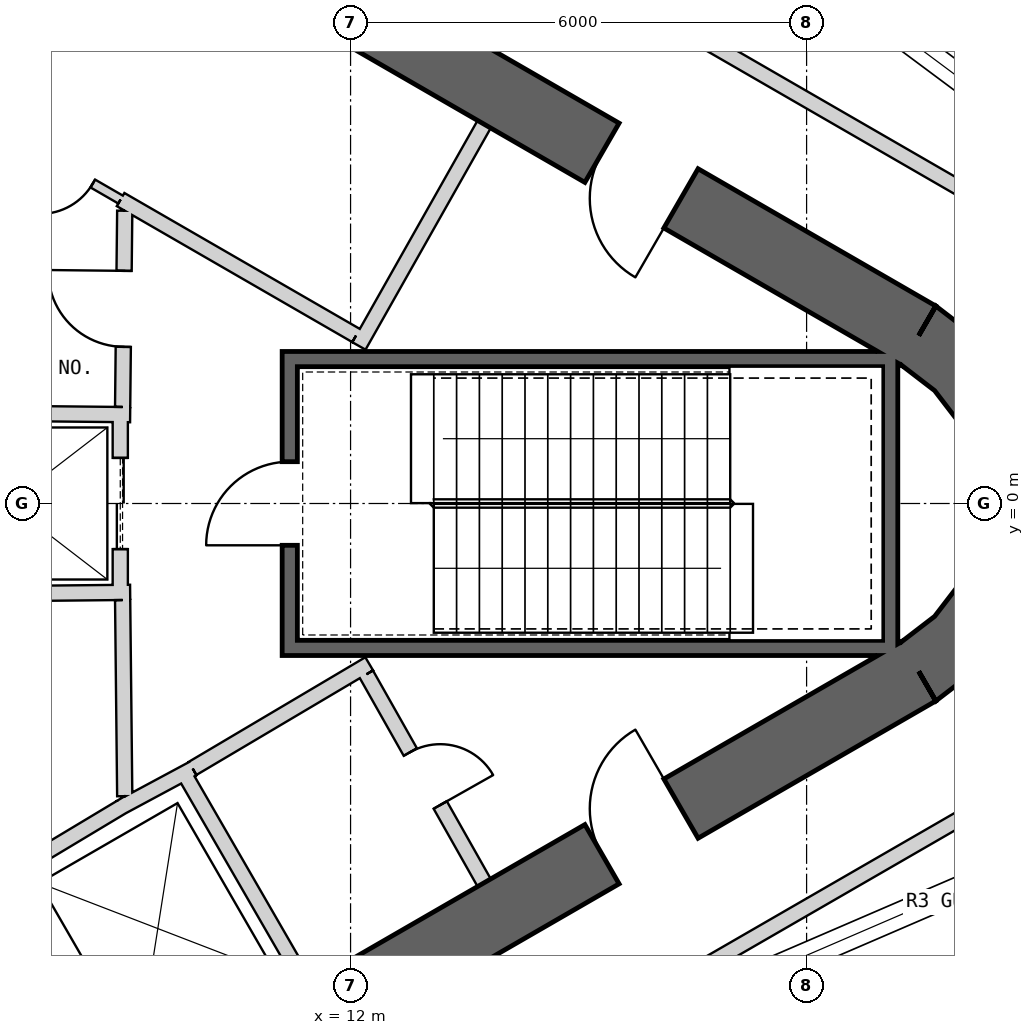
"""IFC4 building model, lengths in metres.
Left out: names, types, materials, properties, quantities, classifications, styles, units other than length and angle.
Written with IfcOpenShell. Run it as: python <this file> out.ifc"""

import sys

from ifc_helpers import new_model, si_unit, direction, frame, frame_2d, origin, place, context, subcontext, project, spatial, polyline, rectangle, outline, extrude, element, fill, save


model = new_model("IFC4")
c1 = context("Model", 3, precision=1e-05, world=origin(), true_north=direction((0.0, 1.0)))
c2 = subcontext(c1, "Body", "Model", "MODEL_VIEW")
j1 = project(units=[si_unit("LENGTHUNIT", "METRE"), si_unit("PLANEANGLEUNIT", "RADIAN")], contexts=[c1])
p1 = place(None, origin())
s1 = spatial("IfcSite", under=j1, at=p1, CompositionType="ELEMENT")
p2 = place(p1, origin())
s2 = spatial("IfcBuilding", under=s1, at=p2, CompositionType="ELEMENT")
p3 = place(p2, frame((0.0, 0.0, 440.3)))
s3 = spatial("IfcBuildingStorey", under=s2, at=p3, CompositionType="ELEMENT", Elevation=440.3)
p4 = place(p3, frame((19.475, 2.208, 0.0), z_axis=(0.0, 0.0, 1.0), x_axis=(-0.866028369851, 0.499994862586, 0.0)))
e1 = element("IfcWall", 1, at=p4, inside=s3, PredefinedType="SHEAR", context=c2, shape_type="SweptSolid", body=[
    extrude(rectangle(XDim=31.523, YDim=0.9, at=frame_2d((15.762, 0.0))), origin(), (0.0, 0.0, 1.0), 4.7),
])
p5 = place(p4, frame((3.612, 0.0, 0.0)))
e2 = element("IfcOpeningElement", 2, at=p5, cuts=e1, PredefinedType="OPENING", context=c2, shape_type="SweptSolid", body=[
    extrude(rectangle(XDim=1.2, YDim=2.4, at=frame_2d((0.6, 1.2))), frame((0.0, 0.46, 0.0), z_axis=(0.0, -1.0, 0.0), x_axis=(1.0, 0.0, 0.0)), (0.0, 0.0, 1.0), 0.92),
])
p6 = place(p4, frame((26.712, 0.0, 0.0)))
e3 = element("IfcOpeningElement", 3, at=p6, cuts=e1, PredefinedType="OPENING", context=c2, shape_type="SweptSolid", body=[
    extrude(rectangle(XDim=1.2, YDim=2.4, at=frame_2d((0.6, 1.2))), frame((0.0, 0.46, 0.0), z_axis=(0.0, -1.0, 0.0), x_axis=(1.0, 0.0, 0.0)), (0.0, 0.0, 1.0), 0.92),
])
p7 = place(p3, frame((-7.825, -17.97, 0.0), z_axis=(0.0, 0.0, 1.0), x_axis=(0.866028369851, 0.499994862586, 0.0)))
e4 = element("IfcWall", 4, at=p7, inside=s3, PredefinedType="SHEAR", context=c2, shape_type="SweptSolid", body=[
    extrude(rectangle(XDim=31.523, YDim=0.9, at=frame_2d((15.762, 0.0))), origin(), (0.0, 0.0, 1.0), 4.7),
])
p8 = place(p7, frame((17.862, 0.0, 0.0)))
e5 = element("IfcOpeningElement", 5, at=p8, cuts=e4, PredefinedType="OPENING", context=c2, shape_type="SweptSolid", body=[
    extrude(rectangle(XDim=1.2, YDim=2.4, at=frame_2d((0.6, 1.2))), frame((0.0, 0.46, 0.0), z_axis=(0.0, -1.0, 0.0), x_axis=(1.0, 0.0, 0.0)), (0.0, 0.0, 1.0), 0.92),
])
p9 = place(p7, frame((20.562, 0.0, 0.0)))
e6 = element("IfcOpeningElement", 6, at=p9, cuts=e4, PredefinedType="OPENING", context=c2, shape_type="SweptSolid", body=[
    extrude(rectangle(XDim=1.2, YDim=2.4, at=frame_2d((0.6, 1.2))), frame((0.0, 0.46, 0.0), z_axis=(0.0, -1.0, 0.0), x_axis=(1.0, 0.0, 0.0)), (0.0, 0.0, 1.0), 0.92),
])
p10 = place(p7, frame((26.712, 0.0, 0.0)))
e7 = element("IfcOpeningElement", 7, at=p10, cuts=e4, PredefinedType="OPENING", context=c2, shape_type="SweptSolid", body=[
    extrude(rectangle(XDim=1.2, YDim=2.4, at=frame_2d((0.6, 1.2))), frame((0.0, 0.46, 0.0), z_axis=(0.0, -1.0, 0.0), x_axis=(1.0, 0.0, 0.0)), (0.0, 0.0, 1.0), 0.92),
])
p11 = place(p7, frame((3.612, 0.0, 0.0)))
e8 = element("IfcOpeningElement", 8, at=p11, cuts=e4, PredefinedType="OPENING", context=c2, shape_type="SweptSolid", body=[
    extrude(rectangle(XDim=1.2, YDim=2.4, at=frame_2d((0.6, 1.2))), frame((0.0, 0.46, 0.0), z_axis=(0.0, -1.0, 0.0), x_axis=(1.0, 0.0, 0.0)), (0.0, 0.0, 1.0), 0.92),
])
p12 = place(p3, origin())
e9 = element("IfcWall", 9, at=p12, inside=s3, PredefinedType="SHEAR", context=c2, shape_type="SweptSolid", body=[
    extrude(outline(polyline([(19.7, -2.598), (20.321, -2.121), (20.798, -1.5), (21.098, -0.777), (21.2, 0.0), (21.098, 0.777), (20.798, 1.5), (20.321, 2.121), (19.7, 2.598), (19.25, 1.819), (19.685, 1.485), (20.019, 1.05), (20.229, 0.543), (20.3, 0.0), (20.229, -0.543), (20.019, -1.05), (19.685, -1.485), (19.25, -1.819), (19.7, -2.598)])), origin(), (0.0, 0.0, 1.0), 4.7),
])
p13 = place(p3, frame((9.795, -3.525, 0.0), z_axis=(0.0, 0.0, 1.0), x_axis=(0.499984717929, -0.866034226713, 0.0)))
e10 = element("IfcWall", 10, at=p13, inside=s3, PredefinedType="PLUMBINGWALL", context=c2, shape_type="SweptSolid", body=[
    extrude(rectangle(XDim=3.25, YDim=0.2, at=frame_2d((1.625, 0.0))), origin(), (0.0, 0.0, 1.0), 4.7),
])
p14 = place(p3, frame((8.974, -3.999, 0.0), z_axis=(0.0, 0.0, 1.0), x_axis=(0.880907015104, 0.473289373154, 0.0)))
e11 = element("IfcWall", 11, at=p14, inside=s3, PredefinedType="PLUMBINGWALL", context=c2, shape_type="SweptSolid", body=[
    extrude(rectangle(XDim=1.078, YDim=0.2, at=frame_2d((0.539, 0.0))), origin(), (0.0, 0.0, 1.0), 4.7),
])
p15 = place(p3, frame((7.497, -4.886, 0.0), z_axis=(0.0, 0.0, 1.0), x_axis=(0.857516281273, 0.51445682749, 0.0)))
e12 = element("IfcWall", 12, at=p15, inside=s3, PredefinedType="PLUMBINGWALL", context=c2, shape_type="SweptSolid", body=[
    extrude(rectangle(XDim=1.845, YDim=0.2, at=frame_2d((0.922, 0.0))), origin(), (0.0, 0.0, 1.0), 4.7),
])
p16 = place(p3, frame((19.2, 1.9, -0.25), z_axis=(0.0, 0.0, 1.0), x_axis=(-1.0, 0.0, 0.0)))
e13 = element("IfcWall", 13, at=p16, inside=s3, PredefinedType="SHEAR", context=c2, shape_type="SweptSolid", body=[
    extrude(rectangle(XDim=8.1, YDim=0.2, at=frame_2d((4.05, 0.0))), origin(), (0.0, 0.0, 1.0), 4.95),
])
p17 = place(p3, frame((19.1, -2.0, -0.25), z_axis=(0.0, 0.0, 1.0), x_axis=(0.0, 1.0, 0.0)))
e14 = element("IfcWall", 14, at=p17, inside=s3, PredefinedType="SHEAR", context=c2, shape_type="SweptSolid", body=[
    extrude(rectangle(XDim=3.8, YDim=0.2, at=frame_2d((1.9, 0.0))), origin(), (0.0, 0.0, 1.0), 4.95),
])
p18 = place(p3, frame((11.1, -1.9, -0.25), z_axis=(0.0, 0.0, 1.0), x_axis=(1.0, 0.0, 0.0)))
e15 = element("IfcWall", 15, at=p18, inside=s3, PredefinedType="SHEAR", context=c2, shape_type="SweptSolid", body=[
    extrude(rectangle(XDim=7.9, YDim=0.2, at=frame_2d((3.95, 0.0))), origin(), (0.0, 0.0, 1.0), 4.95),
])
p19 = place(p3, frame((11.2, -1.8, -0.25), z_axis=(0.0, 0.0, 1.0), x_axis=(0.0, 1.0, 0.0)))
e16 = element("IfcWall", 16, at=p19, inside=s3, PredefinedType="SHEAR", context=c2, shape_type="SweptSolid", body=[
    extrude(rectangle(XDim=3.6, YDim=0.2, at=frame_2d((1.8, 0.0))), origin(), (0.0, 0.0, 1.0), 4.95),
])
p20 = place(p19, frame((1.25, 0.0, 0.25)))
e17 = element("IfcOpeningElement", 17, at=p20, cuts=e16, PredefinedType="OPENING", context=c2, shape_type="SweptSolid", body=[
    extrude(rectangle(XDim=1.1, YDim=2.1, at=frame_2d((0.55, 1.05))), frame((0.0, 0.11, 0.0), z_axis=(0.0, -1.0, 0.0), x_axis=(1.0, 0.0, 0.0)), (0.0, 0.0, 1.0), 0.22),
])
p21 = place(p3, frame((8.97, 1.2, 0.0), z_axis=(0.0, 0.0, 1.0), x_axis=(0.0, -1.0, 0.0)))
e18 = element("IfcWall", 18, at=p21, inside=s3, PredefinedType="PLUMBINGWALL", context=c2, shape_type="SweptSolid", body=[
    extrude(rectangle(XDim=2.4, YDim=0.2, at=frame_2d((1.2, 0.0))), origin(), (0.0, 0.0, 1.0), 4.7),
])
p22 = place(p21, frame((0.6, 0.0, 0.0)))
e19 = element("IfcOpeningElement", 19, at=p22, cuts=e18, PredefinedType="OPENING", context=c2, shape_type="SweptSolid", body=[
    extrude(rectangle(XDim=1.2, YDim=2.4, at=frame_2d((0.6, 1.2))), frame((0.0, 0.11, 0.0), z_axis=(0.0, -1.0, 0.0), x_axis=(1.0, 0.0, 0.0)), (0.0, 0.0, 1.0), 0.22),
])
p23 = place(p3, frame((9.1, -1.169, 0.0), z_axis=(0.0, 0.0, 1.0), x_axis=(-0.999950064753, -0.009993397809, 0.0)))
e20 = element("IfcWall", 20, at=p23, inside=s3, PredefinedType="PLUMBINGWALL", context=c2, shape_type="SweptSolid", body=[
    extrude(rectangle(XDim=3.2, YDim=0.2, at=frame_2d((1.6, 0.0))), origin(), (0.0, 0.0, 1.0), 4.7),
])
p24 = place(p3, frame((9.1, 1.169, 0.0), z_axis=(0.0, 0.0, 1.0), x_axis=(-0.99994990606, 0.010009264196, 0.0)))
e21 = element("IfcWall", 21, at=p24, inside=s3, PredefinedType="PLUMBINGWALL", context=c2, shape_type="SweptSolid", body=[
    extrude(rectangle(XDim=3.0, YDim=0.2, at=frame_2d((1.5, 0.0))), origin(), (0.0, 0.0, 1.0), 4.7),
])
p25 = place(p3, frame((12.11, 2.073, 0.0), z_axis=(0.0, 0.0, 1.0), x_axis=(0.49196600604, 0.870614408852, 0.0)))
e22 = element("IfcWall", 22, at=p25, inside=s3, PredefinedType="PARTITIONING", context=c2, shape_type="SweptSolid", body=[
    extrude(rectangle(XDim=3.35, YDim=0.2, at=frame_2d((1.675, 0.0))), origin(), (0.0, 0.0, 1.0), 4.7),
])
p26 = place(p3, frame((8.974, 3.999, 0.0), z_axis=(0.0, 0.0, 1.0), x_axis=(0.86601284211, -0.500021756827, 0.0)))
e23 = element("IfcWall", 23, at=p26, inside=s3, PredefinedType="PARTITIONING", context=c2, shape_type="SweptSolid", body=[
    extrude(rectangle(XDim=3.577, YDim=0.2, at=frame_2d((1.789, 0.0))), origin(), (0.0, 0.0, 1.0), 4.7),
])
p27 = place(p3, frame((7.55, 4.821, 0.0), z_axis=(0.0, 0.0, 1.0), x_axis=(0.866069384335, -0.499923815713, 0.0)))
e24 = element("IfcWall", 24, at=p27, inside=s3, PredefinedType="PARTITIONING", context=c2, shape_type="SweptSolid", body=[
    extrude(rectangle(XDim=1.644, YDim=0.12, at=frame_2d((0.822, 0.0))), origin(), (0.0, 0.0, 1.0), 4.7),
])
p28 = place(p27, frame((0.422, 0.0, 0.0)))
e25 = element("IfcOpeningElement", 25, at=p28, cuts=e24, PredefinedType="OPENING", context=c2, shape_type="SweptSolid", body=[
    extrude(rectangle(XDim=0.8, YDim=2.1, at=frame_2d((0.4, 1.05))), frame((0.0, 0.07, 0.0), z_axis=(0.0, -1.0, 0.0), x_axis=(1.0, 0.0, 0.0)), (0.0, 0.0, 1.0), 0.14),
])
p29 = place(p3, frame((12.245, -2.109, 0.0), z_axis=(0.0, 0.0, 1.0), x_axis=(-0.860414880418, -0.509594185166, 0.0)))
e26 = element("IfcWall", 26, at=p29, inside=s3, PredefinedType="PARTITIONING", context=c2, shape_type="SweptSolid", body=[
    extrude(rectangle(XDim=2.7, YDim=0.2, at=frame_2d((1.35, 0.0))), origin(), (0.0, 0.0, 1.0), 4.7),
])
p30 = place(p3, frame((13.758, -4.99, 0.0), z_axis=(0.0, 0.0, 1.0), x_axis=(-0.491993409184, 0.87059892334, 0.0)))
e27 = element("IfcWall", 27, at=p30, inside=s3, PredefinedType="PARTITIONING", context=c2, shape_type="SweptSolid", body=[
    extrude(rectangle(XDim=3.15, YDim=0.2, at=frame_2d((1.575, 0.0))), origin(), (0.0, 0.0, 1.0), 4.7),
])
p31 = place(p30, frame((1.175, 0.0, 0.0)))
e28 = element("IfcOpeningElement", 28, at=p31, cuts=e27, PredefinedType="OPENING", context=c2, shape_type="SweptSolid", body=[
    extrude(rectangle(XDim=0.8, YDim=2.1, at=frame_2d((0.4, 1.05))), frame((0.0, 0.11, 0.0), z_axis=(0.0, -1.0, 0.0), x_axis=(1.0, 0.0, 0.0)), (0.0, 0.0, 1.0), 0.22),
])
p32 = place(p3, frame((9.029, -3.851, 0.0), z_axis=(0.0, 0.0, 1.0), x_axis=(-0.010784614026, 0.999941844359, 0.0)))
e29 = element("IfcWall", 29, at=p32, inside=s3, PredefinedType="PARTITIONING", context=c2, shape_type="SweptSolid", body=[
    extrude(rectangle(XDim=2.581, YDim=0.2, at=frame_2d((1.291, 0.0))), origin(), (0.0, 0.0, 1.0), 4.7),
])
p33 = place(p3, frame((9.001, 1.27, 0.0), z_axis=(0.0, 0.0, 1.0), x_axis=(0.010780534828, 0.999941888346, 0.0)))
e30 = element("IfcWall", 30, at=p33, inside=s3, PredefinedType="PARTITIONING", context=c2, shape_type="SweptSolid", body=[
    extrude(rectangle(XDim=2.582, YDim=0.2, at=frame_2d((1.291, 0.0))), origin(), (0.0, 0.0, 1.0), 4.7),
])
p34 = place(p33, frame((0.791, 0.0, 0.0)))
e31 = element("IfcOpeningElement", 31, at=p34, cuts=e30, PredefinedType="OPENING", context=c2, shape_type="SweptSolid", body=[
    extrude(rectangle(XDim=1.0, YDim=2.1, at=frame_2d((0.5, 1.05))), frame((0.0, 0.11, 0.0), z_axis=(0.0, -1.0, 0.0), x_axis=(1.0, 0.0, 0.0)), (0.0, 0.0, 1.0), 0.22),
])
p35 = place(p3, frame((20.834, 3.675, 0.0), z_axis=(0.0, 0.0, 1.0), x_axis=(-0.866028536494, 0.499994573949, 0.0)))
e32 = element("IfcWall", 32, at=p35, inside=s3, PredefinedType="PARTITIONING", context=c2, shape_type="SweptSolid", body=[
    extrude(rectangle(XDim=32.411, YDim=0.2, at=frame_2d((16.206, 0.0))), origin(), (0.0, 0.0, 1.0), 4.7),
])
p36 = place(p35, frame((7.7, 0.0, 0.0)))
e33 = element("IfcOpeningElement", 33, at=p36, cuts=e32, PredefinedType="OPENING", context=c2, shape_type="SweptSolid", body=[
    extrude(rectangle(XDim=1.0, YDim=2.1, at=frame_2d((0.5, 1.05))), frame((0.0, 0.11, 0.0), z_axis=(0.0, -1.0, 0.0), x_axis=(1.0, 0.0, 0.0)), (0.0, 0.0, 1.0), 0.22),
])
p37 = place(p35, frame((18.006, 0.0, 0.0)))
e34 = element("IfcOpeningElement", 34, at=p37, cuts=e32, PredefinedType="OPENING", context=c2, shape_type="SweptSolid", body=[
    extrude(rectangle(XDim=1.0, YDim=2.1, at=frame_2d((0.5, 1.05))), frame((0.0, 0.11, 0.0), z_axis=(0.0, -1.0, 0.0), x_axis=(1.0, 0.0, 0.0)), (0.0, 0.0, 1.0), 0.22),
])
p38 = place(p3, frame((6.698, -11.837, 0.0), z_axis=(0.0, 0.0, 1.0), x_axis=(0.866022444471, 0.500005125646, 0.0)))
e35 = element("IfcWall", 35, at=p38, inside=s3, PredefinedType="PARTITIONING", context=c2, shape_type="SweptSolid", body=[
    extrude(rectangle(XDim=16.124, YDim=0.2, at=frame_2d((8.062, 0.0))), origin(), (0.0, 0.0, 1.0), 4.7),
])
p39 = place(p38, frame((2.044, 0.0, 0.0)))
e36 = element("IfcOpeningElement", 36, at=p39, cuts=e35, PredefinedType="OPENING", context=c2, shape_type="SweptSolid", body=[
    extrude(rectangle(XDim=1.0, YDim=2.1, at=frame_2d((0.5, 1.05))), frame((0.0, 0.11, 0.0), z_axis=(0.0, -1.0, 0.0), x_axis=(1.0, 0.0, 0.0)), (0.0, 0.0, 1.0), 0.22),
])
p40 = place(p20, origin())
e37 = element("IfcDoor", 37, at=p40, inside=s3, OperationType="SINGLE_SWING_LEFT", PredefinedType="USERDEFINED", context=c2, shape_type="SweptSolid", body=[
    extrude(rectangle(XDim=1.1, YDim=2.1, at=frame_2d((0.55, 1.05))), frame((0.0, 0.025, 0.0), z_axis=(0.0, -1.0, 0.0), x_axis=(1.0, 0.0, 0.0)), (0.0, 0.0, 1.0), 0.05),
])
fill(e17, e37)
p41 = place(p34, origin())
e38 = element("IfcDoor", 38, at=p41, inside=s3, OperationType="SINGLE_SWING_RIGHT", PredefinedType="USERDEFINED", context=c2, shape_type="SweptSolid", body=[
    extrude(rectangle(XDim=1.0, YDim=2.1, at=frame_2d((0.5, 1.05))), frame((0.0, 0.025, 0.0), z_axis=(0.0, -1.0, 0.0), x_axis=(1.0, 0.0, 0.0)), (0.0, 0.0, 1.0), 0.05),
])
fill(e31, e38)
p42 = place(p22, origin())
e39 = element("IfcDoor", 39, at=p42, inside=s3, OperationType="SLIDING_TO_LEFT", PredefinedType="USERDEFINED", context=c2, shape_type="SweptSolid", body=[
    extrude(rectangle(XDim=1.2, YDim=2.4, at=frame_2d((0.6, 1.2))), frame((0.0, 0.025, 0.0), z_axis=(0.0, -1.0, 0.0), x_axis=(1.0, 0.0, 0.0)), (0.0, 0.0, 1.0), 0.05),
])
fill(e19, e39)
p43 = place(p28, origin())
e40 = element("IfcDoor", 40, at=p43, inside=s3, OperationType="SINGLE_SWING_LEFT", PredefinedType="USERDEFINED", context=c2, shape_type="SweptSolid", body=[
    extrude(rectangle(XDim=0.8, YDim=2.1, at=frame_2d((0.4, 1.05))), frame((0.0, 0.025, 0.0), z_axis=(0.0, -1.0, 0.0), x_axis=(1.0, 0.0, 0.0)), (0.0, 0.0, 1.0), 0.05),
])
fill(e25, e40)
p44 = place(p31, origin())
e41 = element("IfcDoor", 41, at=p44, inside=s3, OperationType="SINGLE_SWING_LEFT", PredefinedType="USERDEFINED", context=c2, shape_type="SweptSolid", body=[
    extrude(rectangle(XDim=0.8, YDim=2.1, at=frame_2d((0.4, 1.05))), frame((0.0, 0.025, 0.0), z_axis=(0.0, -1.0, 0.0), x_axis=(1.0, 0.0, 0.0)), (0.0, 0.0, 1.0), 0.05),
])
fill(e28, e41)
p45 = place(p10, origin())
e42 = element("IfcDoor", 42, at=p45, inside=s3, OperationType="SINGLE_SWING_RIGHT", PredefinedType="USERDEFINED", context=c2, shape_type="SweptSolid", body=[
    extrude(rectangle(XDim=1.2, YDim=2.4, at=frame_2d((0.6, 1.2))), frame((0.0, 0.025, 0.0), z_axis=(0.0, -1.0, 0.0), x_axis=(1.0, 0.0, 0.0)), (0.0, 0.0, 1.0), 0.05),
])
fill(e7, e42)
p46 = place(p5, origin())
e43 = element("IfcDoor", 43, at=p46, inside=s3, OperationType="SINGLE_SWING_LEFT", PredefinedType="USERDEFINED", context=c2, shape_type="SweptSolid", body=[
    extrude(rectangle(XDim=1.2, YDim=2.4, at=frame_2d((0.6, 1.2))), frame((0.0, 0.025, 0.0), z_axis=(0.0, -1.0, 0.0), x_axis=(1.0, 0.0, 0.0)), (0.0, 0.0, 1.0), 0.05),
])
fill(e2, e43)
save(model, sys.argv[1])
